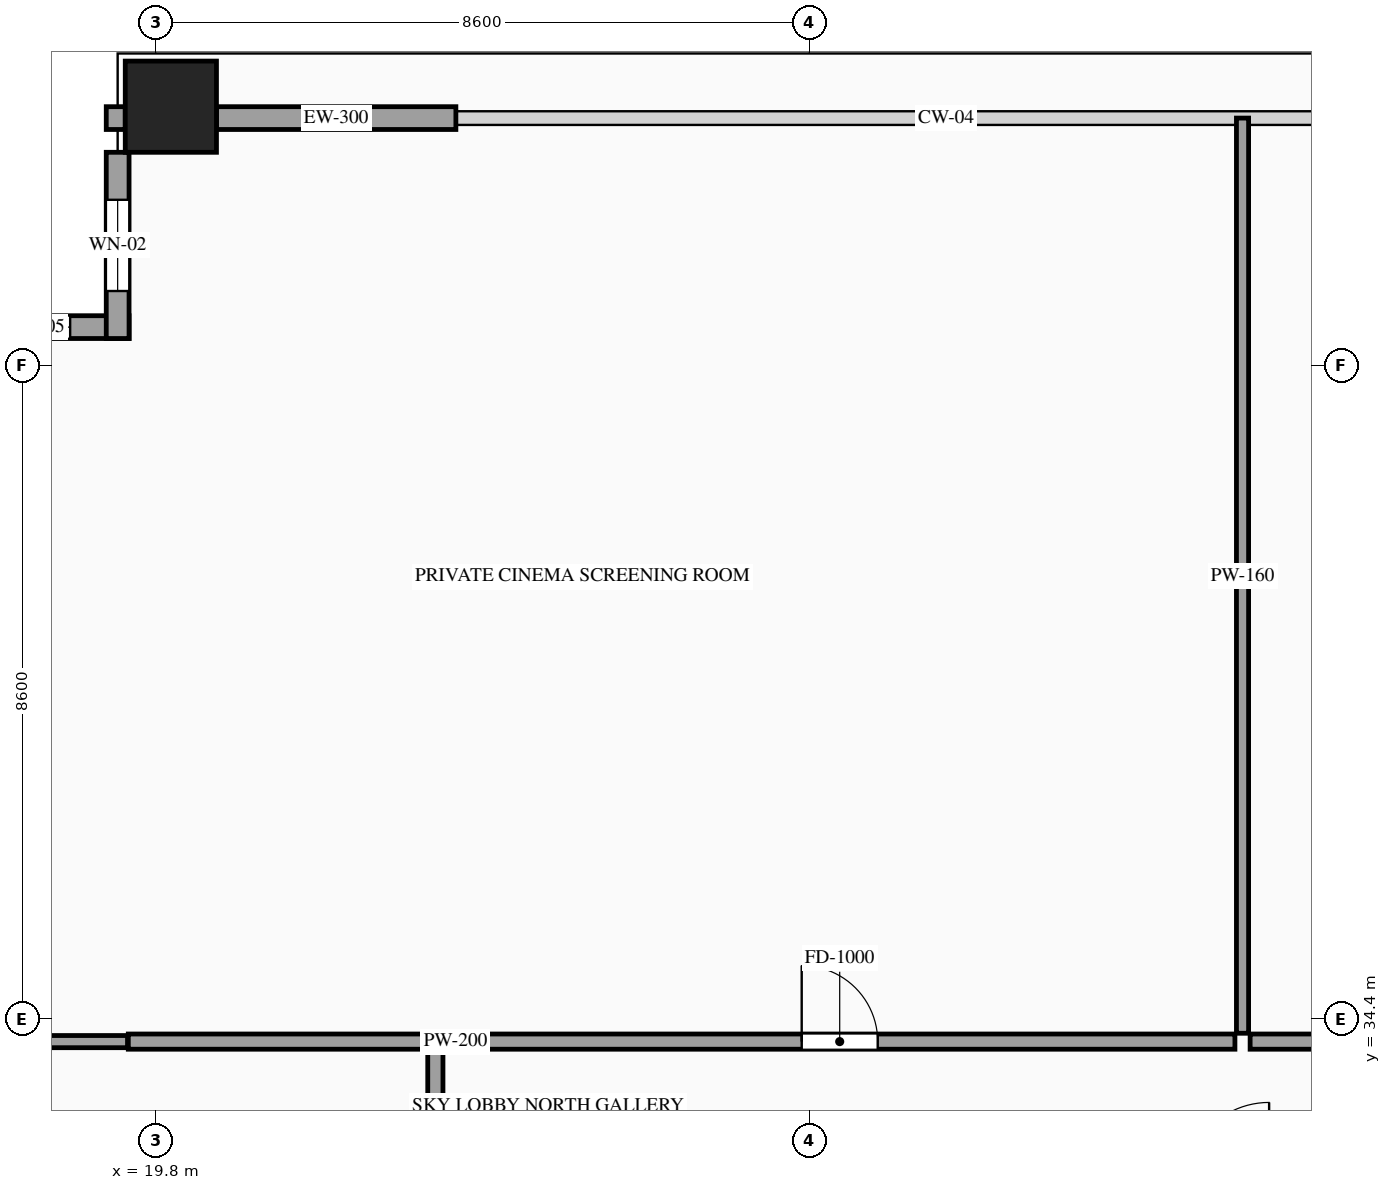
"""IFC4 building model, lengths in metres.
Left out: names, types, materials, properties, quantities, classifications, styles, units other than length and angle.
Written with IfcOpenShell. Run it as: python <this file> out.ifc"""

import sys

from ifc_helpers import new_model, si_unit, direction, frame, frame_2d, origin, origin_2d, place, context, subcontext, project, spatial, rectangle, hollow_rectangle, extrude, source, transform, mapped, element, fill, save


model = new_model("IFC4")
c1 = context("Model", 3, precision=1e-05, world=origin(), true_north=direction((0.0, 1.0)))
c2 = subcontext(c1, "Body", "Model", "MODEL_VIEW")
j1 = project(units=[si_unit("LENGTHUNIT", "METRE"), si_unit("PLANEANGLEUNIT", "RADIAN")], contexts=[c1])
p1 = place(None, origin())
s1 = spatial("IfcSite", under=j1, at=p1, CompositionType="ELEMENT")
p2 = place(p1, origin())
s2 = spatial("IfcBuilding", under=s1, at=p2, CompositionType="ELEMENT")
p3 = place(p2, frame((0.0, 0.0, 259.1)))
s3 = spatial("IfcBuildingStorey", under=s2, at=p3, CompositionType="ELEMENT", Elevation=259.1)
m1 = source(origin(), c2, "Body", "SweptSolid", [
    extrude(hollow_rectangle(XDim=1.2, YDim=1.2, WallThickness=0.055, at=origin_2d()), origin(), (0.0, 0.0, 1.0), 4.4),
])
p4 = place(p3, frame((20.0, 46.4, 0.0), z_axis=(0.0, 0.0, 1.0), x_axis=(1.0, 0.0, 0.0)))
e1 = element("IfcColumn", 1, at=p4, inside=s3, PredefinedType="COLUMN", context=c2, shape_type="MappedRepresentation", body=[
    mapped(m1, transform((0.0, 0.0, 0.0), scale=1.0)),
])
p5 = place(p3, frame((19.45, 43.5, 0.0), z_axis=(0.0, 0.0, 1.0), x_axis=(-1.0, 0.0, 0.0)))
e2 = element("IfcWall", 2, at=p5, inside=s3, PredefinedType="SOLIDWALL", context=c2, shape_type="SweptSolid", body=[
    extrude(rectangle(XDim=2.45, YDim=0.3, at=frame_2d((1.225, 0.0))), origin(), (0.0, 0.0, 1.0), 4.12),
])
p6 = place(p5, frame((0.775, 0.0, 0.85)))
e3 = element("IfcOpeningElement", 3, at=p6, cuts=e2, PredefinedType="OPENING", context=c2, shape_type="SweptSolid", body=[
    extrude(rectangle(XDim=0.9, YDim=1.5, at=frame_2d((0.45, 0.75))), frame((0.0, 0.165, 0.0), z_axis=(0.0, -1.0, 0.0), x_axis=(1.0, 0.0, 0.0)), (0.0, 0.0, 1.0), 0.33),
])
p7 = place(p3, frame((19.3, 45.8, 0.0), z_axis=(0.0, 0.0, 1.0), x_axis=(0.0, -1.0, 0.0)))
e4 = element("IfcWall", 4, at=p7, inside=s3, PredefinedType="SOLIDWALL", context=c2, shape_type="SweptSolid", body=[
    extrude(rectangle(XDim=2.45, YDim=0.3, at=frame_2d((1.225, 0.0))), origin(), (0.0, 0.0, 1.0), 4.12),
])
p8 = place(p7, frame((0.625, 0.0, 0.85)))
e5 = element("IfcOpeningElement", 5, at=p8, cuts=e4, PredefinedType="OPENING", context=c2, shape_type="SweptSolid", body=[
    extrude(rectangle(XDim=1.2, YDim=2.1, at=frame_2d((0.6, 1.05))), frame((0.0, 0.165, 0.0), z_axis=(0.0, -1.0, 0.0), x_axis=(1.0, 0.0, 0.0)), (0.0, 0.0, 1.0), 0.33),
])
m2 = source(origin(), c2, "Body", "SweptSolid", [
    extrude(rectangle(XDim=0.25, YDim=0.3, at=frame_2d((0.125, 0.0))), origin(), (0.0, 0.0, 1.0), 4.12),
])
p9 = place(p3, frame((19.15, 46.25, 0.0), z_axis=(0.0, 0.0, 1.0), x_axis=(1.0, 0.0, 0.0)))
e6 = element("IfcWall", 6, at=p9, inside=s3, PredefinedType="SOLIDWALL", context=c2, shape_type="MappedRepresentation", body=[
    mapped(m2, transform((0.0, 0.0, 0.0), scale=1.0)),
])
m3 = source(origin(), c2, "Body", "SweptSolid", [
    extrude(rectangle(XDim=3.15, YDim=0.3, at=frame_2d((1.575, 0.0))), origin(), (0.0, 0.0, 1.0), 3.675),
])
p10 = place(p3, frame((20.6, 46.25, 0.0), z_axis=(0.0, 0.0, 1.0), x_axis=(1.0, 0.0, 0.0)))
e7 = element("IfcWall", 7, at=p10, inside=s3, PredefinedType="SOLIDWALL", context=c2, shape_type="MappedRepresentation", body=[
    mapped(m3, transform((0.0, 0.0, 0.0), scale=1.0)),
])
m4 = source(origin(), c2, "Body", "SweptSolid", [
    extrude(rectangle(XDim=1.74, YDim=0.2, at=frame_2d((0.87, 0.0))), origin(), (0.0, 0.0, 1.0), 4.12),
])
p11 = place(p3, frame((23.48, 32.25, 0.0), z_axis=(0.0, 0.0, 1.0), x_axis=(0.0, 1.0, 0.0)))
e8 = element("IfcWall", 8, at=p11, inside=s3, PredefinedType="PARTITIONING", context=c2, shape_type="MappedRepresentation", body=[
    mapped(m4, transform((0.0, 0.0, 0.0), scale=1.0)),
])
m5 = source(origin(), c2, "Body", "SweptSolid", [
    extrude(rectangle(XDim=2.88, YDim=0.16, at=frame_2d((1.44, 0.0))), origin(), (0.0, 0.0, 1.0), 4.12),
])
p12 = place(p3, frame((16.55, 34.1, 0.0), z_axis=(0.0, 0.0, 1.0), x_axis=(1.0, 0.0, 0.0)))
e9 = element("IfcWall", 9, at=p12, inside=s3, PredefinedType="PARTITIONING", context=c2, shape_type="MappedRepresentation", body=[
    mapped(m5, transform((0.0, 0.0, 0.0), scale=1.0)),
])
p13 = place(p3, frame((19.44, 34.1, 0.0), z_axis=(0.0, 0.0, 1.0), x_axis=(1.0, 0.0, 0.0)))
e10 = element("IfcWall", 10, at=p13, inside=s3, PredefinedType="PARTITIONING", context=c2, shape_type="SweptSolid", body=[
    extrude(rectangle(XDim=14.56, YDim=0.2, at=frame_2d((7.28, 0.0))), origin(), (0.0, 0.0, 1.0), 4.12),
])
p14 = place(p13, frame((8.86, 0.0, 0.0)))
e11 = element("IfcOpeningElement", 11, at=p14, cuts=e10, PredefinedType="OPENING", context=c2, shape_type="SweptSolid", body=[
    extrude(rectangle(XDim=1.0, YDim=2.2, at=frame_2d((0.5, 1.1))), frame((0.0, 0.115, 0.0), z_axis=(0.0, -1.0, 0.0), x_axis=(1.0, 0.0, 0.0)), (0.0, 0.0, 1.0), 0.23),
])
m6 = source(origin(), c2, "Body", "SweptSolid", [
    extrude(rectangle(XDim=12.04, YDim=0.16, at=frame_2d((6.02, 0.0))), origin(), (0.0, 0.0, 1.0), 4.12),
])
p15 = place(p3, frame((34.1, 34.21, 0.0), z_axis=(0.0, 0.0, 1.0), x_axis=(0.0, 1.0, 0.0)))
e12 = element("IfcWall", 12, at=p15, inside=s3, PredefinedType="PARTITIONING", context=c2, shape_type="MappedRepresentation", body=[
    mapped(m6, transform((0.0, 0.0, 0.0), scale=1.0)),
])
p16 = place(p3, frame((34.2, 34.1, 0.0), z_axis=(0.0, 0.0, 1.0), x_axis=(1.0, 0.0, 0.0)))
e13 = element("IfcWall", 13, at=p16, inside=s3, PredefinedType="PARTITIONING", context=c2, shape_type="SweptSolid", body=[
    extrude(rectangle(XDim=3.6, YDim=0.2, at=frame_2d((1.8, 0.0))), origin(), (0.0, 0.0, 1.0), 4.12),
])
p17 = place(p16, frame((1.3, 0.0, 0.0)))
e14 = element("IfcOpeningElement", 14, at=p17, cuts=e13, PredefinedType="OPENING", context=c2, shape_type="SweptSolid", body=[
    extrude(rectangle(XDim=1.0, YDim=2.2, at=frame_2d((0.5, 1.1))), frame((0.0, 0.115, 0.0), z_axis=(0.0, -1.0, 0.0), x_axis=(1.0, 0.0, 0.0)), (0.0, 0.0, 1.0), 0.23),
])
m7 = source(origin(), c2, "Body", "SweptSolid", [
    extrude(rectangle(XDim=0.9, YDim=1.5, at=frame_2d((0.45, 0.75))), frame((0.0, 0.03, 0.0), z_axis=(0.0, -1.0, 0.0), x_axis=(1.0, 0.0, 0.0)), (0.0, 0.0, 1.0), 0.06),
])
p18 = place(p6, origin())
e15 = element("IfcWindow", 15, at=p18, inside=s3, PartitioningType="SINGLE_PANEL", PredefinedType="WINDOW", context=c2, shape_type="MappedRepresentation", body=[
    mapped(m7, transform((0.0, 0.0, 0.0), scale=1.0)),
])
fill(e3, e15)
m8 = source(origin(), c2, "Body", "SweptSolid", [
    extrude(rectangle(XDim=1.2, YDim=2.1, at=frame_2d((0.6, 1.05))), frame((0.0, 0.03, 0.0), z_axis=(0.0, -1.0, 0.0), x_axis=(1.0, 0.0, 0.0)), (0.0, 0.0, 1.0), 0.06),
])
p19 = place(p8, origin())
e16 = element("IfcWindow", 16, at=p19, inside=s3, PartitioningType="SINGLE_PANEL", PredefinedType="WINDOW", context=c2, shape_type="MappedRepresentation", body=[
    mapped(m8, transform((0.0, 0.0, 0.0), scale=1.0)),
])
fill(e5, e16)
m9 = source(origin(), c2, "Body", "SweptSolid", [
    extrude(rectangle(XDim=1.0, YDim=2.2, at=frame_2d((0.5, 1.1))), frame((0.0, 0.025, 0.0), z_axis=(0.0, -1.0, 0.0), x_axis=(1.0, 0.0, 0.0)), (0.0, 0.0, 1.0), 0.05),
])
p20 = place(p14, origin())
e17 = element("IfcDoor", 17, at=p20, inside=s3, OperationType="SINGLE_SWING_LEFT", PredefinedType="DOOR", context=c2, shape_type="MappedRepresentation", body=[
    mapped(m9, transform((0.0, 0.0, 0.0), scale=1.0)),
])
fill(e11, e17)
save(model, sys.argv[1])
